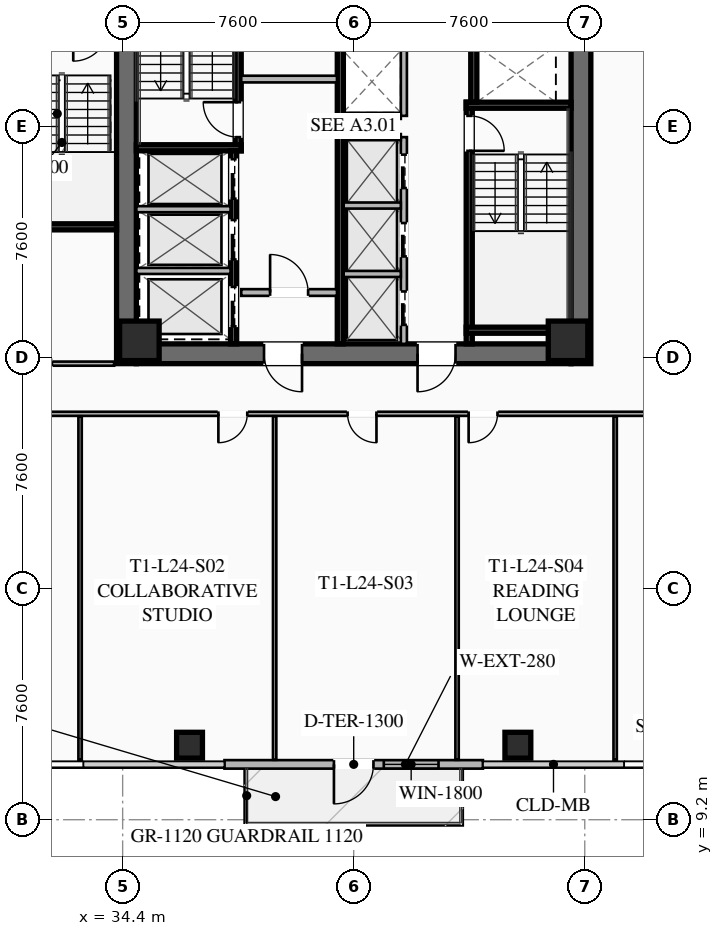
"""IFC4 building model, lengths in metres.
Left out: names, types, materials, properties, quantities, classifications, styles, units other than length and angle.
Written with IfcOpenShell. Run it as: python <this file> out.ifc"""

import sys

from ifc_helpers import new_model, si_unit, direction, frame, frame_2d, origin, origin_2d, place, context, subcontext, project, spatial, rectangle, hollow_rectangle, extrude, element, fill, save


model = new_model("IFC4")
c1 = context("Model", 3, precision=1e-05, world=origin(), true_north=direction((0.0, 1.0)))
c2 = subcontext(c1, "Body", "Model", "MODEL_VIEW")
j1 = project(units=[si_unit("LENGTHUNIT", "METRE"), si_unit("PLANEANGLEUNIT", "RADIAN")], contexts=[c1])
p1 = place(None, origin())
s1 = spatial("IfcSite", under=j1, at=p1, CompositionType="ELEMENT")
p2 = place(p1, origin())
s2 = spatial("IfcBuilding", under=s1, at=p2, CompositionType="ELEMENT")
p3 = place(p2, frame((0.0, 0.0, 92.05)))
s3 = spatial("IfcBuildingStorey", under=s2, at=p3, CompositionType="ELEMENT", Elevation=92.05)
for number, where, z_axis, x_axis in (
    (1, (34.525, 24.2, 0.0), (0.0, 0.0, 1.0), (0.0, 1.0, 0.0)),
    (2, (49.475, 39.8, 0.0), (0.0, 0.0, 1.0), (0.0, -1.0, 0.0)),
):
    element("IfcWall", number, at=place(p3, frame(where, z_axis=z_axis, x_axis=x_axis)), inside=s3, PredefinedType="SHEAR", context=c2, shape_type="SweptSolid", body=[
        extrude(rectangle(XDim=15.6, YDim=0.65, at=frame_2d((7.8, 0.0))), origin(), (0.0, 0.0, 1.0), 3.55),
    ])
p4 = place(p3, frame((49.15, 24.525, 0.0), z_axis=(0.0, 0.0, 1.0), x_axis=(-1.0, 0.0, 0.0)))
e3 = element("IfcWall", 3, at=p4, inside=s3, PredefinedType="SHEAR", context=c2, shape_type="SweptSolid", body=[
    extrude(rectangle(XDim=14.3, YDim=0.65, at=frame_2d((7.15, 0.0))), origin(), (0.0, 0.0, 1.0), 3.55),
])
p5 = place(p4, frame((8.85, 0.0, 0.0)))
e4 = element("IfcOpeningElement", 4, at=p5, cuts=e3, PredefinedType="OPENING", context=c2, shape_type="SweptSolid", body=[
    extrude(rectangle(XDim=1.25, YDim=2.25, at=frame_2d((0.625, 1.125))), frame((0.0, 0.335, 0.0), z_axis=(0.0, -1.0, 0.0), x_axis=(1.0, 0.0, 0.0)), (0.0, 0.0, 1.0), 0.67),
])
p6 = place(p4, frame((3.8, 0.0, 0.0)))
e5 = element("IfcOpeningElement", 5, at=p6, cuts=e3, PredefinedType="OPENING", context=c2, shape_type="SweptSolid", body=[
    extrude(rectangle(XDim=1.25, YDim=2.25, at=frame_2d((0.625, 1.125))), frame((0.0, 0.335, 0.0), z_axis=(0.0, -1.0, 0.0), x_axis=(1.0, 0.0, 0.0)), (0.0, 0.0, 1.0), 0.67),
])
for number, where, z_axis, x_axis in (
    (6, (34.95, 24.95, 0.0), (0.0, 0.0, 1.0), (1.0, 0.0, 0.0)),
    (7, (49.05, 24.95, 0.0), (0.0, 0.0, 1.0), (1.0, 0.0, 0.0)),
):
    element("IfcColumn", number, at=place(p3, frame(where, z_axis=z_axis, x_axis=x_axis)), inside=s3, PredefinedType="COLUMN", context=c2, shape_type="SweptSolid", body=[
        extrude(hollow_rectangle(XDim=1.3, YDim=1.3, WallThickness=0.05, at=origin_2d()), origin(), (0.0, 0.0, 1.0), 3.35),
    ])
for number, where, z_axis, x_axis in (
    (8, (36.6, 11.65, 0.0), (0.0, 0.0, 1.0), (1.0, 0.0, 0.0)),
    (9, (47.4, 11.65, 0.0), (0.0, 0.0, 1.0), (1.0, 0.0, 0.0)),
):
    element("IfcColumn", number, at=place(p3, frame(where, z_axis=z_axis, x_axis=x_axis)), inside=s3, PredefinedType="COLUMN", context=c2, shape_type="SweptSolid", body=[
        extrude(hollow_rectangle(XDim=0.85, YDim=0.85, WallThickness=0.035, at=origin_2d()), origin(), (0.0, 0.0, 1.0), 3.35),
    ])
p7 = place(p3, frame((46.25, 11.02, 0.0), z_axis=(0.0, 0.0, 1.0), x_axis=(-1.0, 0.0, 0.0)))
e10 = element("IfcWall", 10, at=p7, inside=s3, PredefinedType="SOLIDWALL", context=c2, shape_type="SweptSolid", body=[
    extrude(rectangle(XDim=8.5, YDim=0.28, at=frame_2d((4.25, 0.0))), origin(), (0.0, 0.0, 1.0), 3.35),
])
p8 = place(p7, frame((3.6, 0.0, 0.0)))
e11 = element("IfcOpeningElement", 11, at=p8, cuts=e10, PredefinedType="OPENING", context=c2, shape_type="SweptSolid", body=[
    extrude(rectangle(XDim=1.3, YDim=2.15, at=frame_2d((0.65, 1.075))), frame((0.0, 0.15, 0.0), z_axis=(0.0, -1.0, 0.0), x_axis=(1.0, 0.0, 0.0)), (0.0, 0.0, 1.0), 0.3),
])
p9 = place(p7, frame((1.46, 0.0, 0.85)))
e12 = element("IfcOpeningElement", 12, at=p9, cuts=e10, PredefinedType="OPENING", context=c2, shape_type="SweptSolid", body=[
    extrude(rectangle(XDim=1.8, YDim=1.92, at=frame_2d((0.9, 0.96))), frame((0.0, 0.15, 0.0), z_axis=(0.0, -1.0, 0.0), x_axis=(1.0, 0.0, 0.0)), (0.0, 0.0, 1.0), 0.3),
])
p10 = place(p3, frame((38.2, 31.2, 0.0), z_axis=(0.0, 0.0, 1.0), x_axis=(0.0, 1.0, 0.0)))
e13 = element("IfcWall", 13, at=p10, inside=s3, PredefinedType="SHEAR", context=c2, shape_type="SweptSolid", body=[
    extrude(rectangle(XDim=7.95, YDim=0.2, at=frame_2d((3.975, 0.0))), origin(), (0.0, 0.0, 1.0), 3.35),
])
p11 = place(p10, frame((0.45, 0.0, 0.0)))
e14 = element("IfcOpeningElement", 14, at=p11, cuts=e13, PredefinedType="OPENING", context=c2, shape_type="SweptSolid", body=[
    extrude(rectangle(XDim=1.15, YDim=2.2, at=frame_2d((0.575, 1.1))), frame((0.0, 0.11, 0.0), z_axis=(0.0, -1.0, 0.0), x_axis=(1.0, 0.0, 0.0)), (0.0, 0.0, 1.0), 0.22),
])
p12 = place(p3, frame((34.85, 31.3, 0.0), z_axis=(0.0, 0.0, 1.0), x_axis=(1.0, 0.0, 0.0)))
e15 = element("IfcWall", 15, at=p12, inside=s3, PredefinedType="SHEAR", context=c2, shape_type="SweptSolid", body=[
    extrude(rectangle(XDim=3.45, YDim=0.2, at=frame_2d((1.725, 0.0))), origin(), (0.0, 0.0, 1.0), 3.35),
])
p13 = place(p3, frame((45.8, 32.8, 0.0), z_axis=(0.0, 0.0, 1.0), x_axis=(0.0, -1.0, 0.0)))
e16 = element("IfcWall", 16, at=p13, inside=s3, PredefinedType="SHEAR", context=c2, shape_type="SweptSolid", body=[
    extrude(rectangle(XDim=7.95, YDim=0.2, at=frame_2d((3.975, 0.0))), origin(), (0.0, 0.0, 1.0), 3.35),
])
p14 = place(p13, frame((0.45, 0.0, 0.0)))
e17 = element("IfcOpeningElement", 17, at=p14, cuts=e16, PredefinedType="OPENING", context=c2, shape_type="SweptSolid", body=[
    extrude(rectangle(XDim=1.15, YDim=2.2, at=frame_2d((0.575, 1.1))), frame((0.0, 0.11, 0.0), z_axis=(0.0, -1.0, 0.0), x_axis=(1.0, 0.0, 0.0)), (0.0, 0.0, 1.0), 0.22),
])
for number, where, z_axis, x_axis in (
    (18, (45.7, 32.7, 0.0), (0.0, 0.0, 1.0), (1.0, 0.0, 0.0)),
    (19, (45.7, 25.3, 0.0), (0.0, 0.0, 1.0), (1.0, 0.0, 0.0)),
):
    element("IfcWall", number, at=place(p3, frame(where, z_axis=z_axis, x_axis=x_axis)), inside=s3, PredefinedType="SHEAR", context=c2, shape_type="SweptSolid", body=[
        extrude(rectangle(XDim=3.45, YDim=0.2, at=frame_2d((1.725, 0.0))), origin(), (0.0, 0.0, 1.0), 3.35),
    ])
p15 = place(p3, frame((41.56, 24.85, 0.0), z_axis=(0.0, 0.0, 1.0), x_axis=(0.0, 1.0, 0.0)))
e20 = element("IfcWall", 20, at=p15, inside=s3, PredefinedType="SHEAR", context=c2, shape_type="SweptSolid", body=[
    extrude(rectangle(XDim=14.3, YDim=0.2, at=frame_2d((7.15, 0.0))), origin(), (0.0, 0.0, 1.0), 3.35),
])
p16 = place(p3, frame((38.3, 33.56, 0.0), z_axis=(0.0, 0.0, 1.0), x_axis=(1.0, 0.0, 0.0)))
e21 = element("IfcWall", 21, at=p16, inside=s3, PredefinedType="SOLIDWALL", context=c2, shape_type="SweptSolid", body=[
    extrude(rectangle(XDim=3.15, YDim=0.22, at=frame_2d((1.575, 0.0))), origin(), (0.0, 0.0, 1.0), 2.703),
])
p17 = place(p3, frame((38.3, 26.54, 0.0), z_axis=(0.0, 0.0, 1.0), x_axis=(1.0, 0.0, 0.0)))
e22 = element("IfcWall", 22, at=p17, inside=s3, PredefinedType="SOLIDWALL", context=c2, shape_type="SweptSolid", body=[
    extrude(rectangle(XDim=3.15, YDim=0.22, at=frame_2d((1.575, 0.0))), origin(), (0.0, 0.0, 1.0), 2.703),
])
p18 = place(p17, frame((0.95, 0.0, 0.0)))
e23 = element("IfcOpeningElement", 23, at=p18, cuts=e22, PredefinedType="OPENING", context=c2, shape_type="SweptSolid", body=[
    extrude(rectangle(XDim=1.25, YDim=2.25, at=frame_2d((0.625, 1.125))), frame((0.0, 0.12, 0.0), z_axis=(0.0, -1.0, 0.0), x_axis=(1.0, 0.0, 0.0)), (0.0, 0.0, 1.0), 0.24),
])
p19 = place(p3, frame((38.05, 24.85, 0.0), z_axis=(0.0, 0.0, 1.0), x_axis=(0.0, 1.0, 0.0)))
e24 = element("IfcWall", 24, at=p19, inside=s3, PredefinedType="SHEAR", context=c2, shape_type="SweptSolid", body=[
    extrude(rectangle(XDim=6.35, YDim=0.2, at=frame_2d((3.175, 0.0))), origin(), (0.0, 0.0, 1.0), 3.35),
])
p20 = place(p19, frame((4.775, 0.0, 0.0)))
e25 = element("IfcOpeningElement", 25, at=p20, cuts=e24, PredefinedType="OPENING", context=c2, shape_type="SweptSolid", body=[
    extrude(rectangle(XDim=1.3, YDim=2.25, at=frame_2d((0.65, 1.125))), frame((0.0, 0.11, 0.0), z_axis=(0.0, -1.0, 0.0), x_axis=(1.0, 0.0, 0.0)), (0.0, 0.0, 1.0), 0.22),
])
p21 = place(p19, frame((2.775, 0.0, 0.0)))
e26 = element("IfcOpeningElement", 26, at=p21, cuts=e24, PredefinedType="OPENING", context=c2, shape_type="SweptSolid", body=[
    extrude(rectangle(XDim=1.3, YDim=2.25, at=frame_2d((0.65, 1.125))), frame((0.0, 0.11, 0.0), z_axis=(0.0, -1.0, 0.0), x_axis=(1.0, 0.0, 0.0)), (0.0, 0.0, 1.0), 0.22),
])
p22 = place(p19, frame((0.575, 0.0, 0.0)))
e27 = element("IfcOpeningElement", 27, at=p22, cuts=e24, PredefinedType="OPENING", context=c2, shape_type="SweptSolid", body=[
    extrude(rectangle(XDim=1.3, YDim=2.25, at=frame_2d((0.65, 1.125))), frame((0.0, 0.11, 0.0), z_axis=(0.0, -1.0, 0.0), x_axis=(1.0, 0.0, 0.0)), (0.0, 0.0, 1.0), 0.22),
])
for number, where, z_axis, x_axis in (
    (28, (34.85, 27.25, 0.0), (0.0, 0.0, 1.0), (1.0, 0.0, 0.0)),
    (29, (34.85, 29.28, 0.0), (0.0, 0.0, 1.0), (1.0, 0.0, 0.0)),
):
    element("IfcWall", number, at=place(p3, frame(where, z_axis=z_axis, x_axis=x_axis)), inside=s3, PredefinedType="SOLIDWALL", context=c2, shape_type="SweptSolid", body=[
        extrude(rectangle(XDim=3.1, YDim=0.2, at=frame_2d((1.55, 0.0))), origin(), (0.0, 0.0, 1.0), 3.35),
    ])
p23 = place(p3, frame((45.95, 39.15, 0.0), z_axis=(0.0, 0.0, 1.0), x_axis=(0.0, -1.0, 0.0)))
e30 = element("IfcWall", 30, at=p23, inside=s3, PredefinedType="SHEAR", context=c2, shape_type="SweptSolid", body=[
    extrude(rectangle(XDim=6.35, YDim=0.2, at=frame_2d((3.175, 0.0))), origin(), (0.0, 0.0, 1.0), 3.35),
])
p24 = place(p3, frame((43.65, 24.85, 0.0), z_axis=(0.0, 0.0, 1.0), x_axis=(0.0, 1.0, 0.0)))
e31 = element("IfcWall", 31, at=p24, inside=s3, PredefinedType="SOLIDWALL", context=c2, shape_type="SweptSolid", body=[
    extrude(rectangle(XDim=6.8, YDim=0.2, at=frame_2d((3.4, 0.0))), origin(), (0.0, 0.0, 1.0), 3.35),
])
p25 = place(p24, frame((0.625, 0.0, 0.0)))
e32 = element("IfcOpeningElement", 32, at=p25, cuts=e31, PredefinedType="OPENING", context=c2, shape_type="SweptSolid", body=[
    extrude(rectangle(XDim=1.1, YDim=2.2, at=frame_2d((0.55, 1.1))), frame((0.0, 0.11, 0.0), z_axis=(0.0, -1.0, 0.0), x_axis=(1.0, 0.0, 0.0)), (0.0, 0.0, 1.0), 0.22),
])
p26 = place(p24, frame((2.875, 0.0, 0.0)))
e33 = element("IfcOpeningElement", 33, at=p26, cuts=e31, PredefinedType="OPENING", context=c2, shape_type="SweptSolid", body=[
    extrude(rectangle(XDim=1.1, YDim=2.2, at=frame_2d((0.55, 1.1))), frame((0.0, 0.11, 0.0), z_axis=(0.0, -1.0, 0.0), x_axis=(1.0, 0.0, 0.0)), (0.0, 0.0, 1.0), 0.22),
])
p27 = place(p24, frame((5.125, 0.0, 0.0)))
e34 = element("IfcOpeningElement", 34, at=p27, cuts=e31, PredefinedType="OPENING", context=c2, shape_type="SweptSolid", body=[
    extrude(rectangle(XDim=1.1, YDim=2.2, at=frame_2d((0.55, 1.1))), frame((0.0, 0.11, 0.0), z_axis=(0.0, -1.0, 0.0), x_axis=(1.0, 0.0, 0.0)), (0.0, 0.0, 1.0), 0.22),
])
for number, where, z_axis, x_axis in (
    (35, (41.67, 27.15, 0.0), (0.0, 0.0, 1.0), (1.0, 0.0, 0.0)),
    (36, (41.67, 29.4, 0.0), (0.0, 0.0, 1.0), (1.0, 0.0, 0.0)),
    (37, (41.67, 31.65, 0.0), (0.0, 0.0, 1.0), (1.0, 0.0, 0.0)),
):
    element("IfcWall", number, at=place(p3, frame(where, z_axis=z_axis, x_axis=x_axis)), inside=s3, PredefinedType="SOLIDWALL", context=c2, shape_type="SweptSolid", body=[
        extrude(rectangle(XDim=1.88, YDim=0.2, at=frame_2d((0.94, 0.0))), origin(), (0.0, 0.0, 1.0), 3.35),
    ])
p28 = place(p3, frame((43.65, 32.35, 0.0), z_axis=(0.0, 0.0, 1.0), x_axis=(0.0, 1.0, 0.0)))
e38 = element("IfcWall", 38, at=p28, inside=s3, PredefinedType="SOLIDWALL", context=c2, shape_type="SweptSolid", body=[
    extrude(rectangle(XDim=6.8, YDim=0.2, at=frame_2d((3.4, 0.0))), origin(), (0.0, 0.0, 1.0), 3.35),
])
p29 = place(p3, frame((41.67, 32.35, 0.0), z_axis=(0.0, 0.0, 1.0), x_axis=(1.0, 0.0, 0.0)))
e39 = element("IfcWall", 39, at=p29, inside=s3, PredefinedType="SOLIDWALL", context=c2, shape_type="SweptSolid", body=[
    extrude(rectangle(XDim=1.88, YDim=0.2, at=frame_2d((0.94, 0.0))), origin(), (0.0, 0.0, 1.0), 3.35),
])
p30 = place(p3, frame((30.8, 28.7, 0.0), z_axis=(0.0, 0.0, 1.0), x_axis=(1.0, 0.0, 0.0)))
e40 = element("IfcWall", 40, at=p30, inside=s3, PredefinedType="SHEAR", context=c2, shape_type="SweptSolid", body=[
    extrude(rectangle(XDim=3.4, YDim=0.2, at=frame_2d((1.7, 0.0))), origin(), (0.0, 0.0, 1.0), 3.35),
])
p31 = place(p3, frame((53.1, 22.55, 0.0), z_axis=(0.0, 0.0, 1.0), x_axis=(-1.0, 0.0, 0.0)))
e41 = element("IfcWall", 41, at=p31, inside=s3, PredefinedType="PARTITIONING", context=c2, shape_type="SweptSolid", body=[
    extrude(rectangle(XDim=29.05, YDim=0.135, at=frame_2d((14.525, 0.0))), origin(), (0.0, 0.0, 1.0), 2.703),
])
p32 = place(p31, frame((27.72, 0.0, 0.0)))
e42 = element("IfcOpeningElement", 42, at=p32, cuts=e41, PredefinedType="OPENING", context=c2, shape_type="SweptSolid", body=[
    extrude(rectangle(XDim=0.95, YDim=2.05, at=frame_2d((0.475, 1.025))), frame((0.0, 0.077, 0.0), z_axis=(0.0, -1.0, 0.0), x_axis=(1.0, 0.0, 0.0)), (0.0, 0.0, 1.0), 0.155),
])
p33 = place(p31, frame((14.601, 0.0, 0.0)))
e43 = element("IfcOpeningElement", 43, at=p33, cuts=e41, PredefinedType="OPENING", context=c2, shape_type="SweptSolid", body=[
    extrude(rectangle(XDim=0.95, YDim=2.05, at=frame_2d((0.475, 1.025))), frame((0.0, 0.077, 0.0), z_axis=(0.0, -1.0, 0.0), x_axis=(1.0, 0.0, 0.0)), (0.0, 0.0, 1.0), 0.155),
])
p34 = place(p31, frame((10.351, 0.0, 0.0)))
e44 = element("IfcOpeningElement", 44, at=p34, cuts=e41, PredefinedType="OPENING", context=c2, shape_type="SweptSolid", body=[
    extrude(rectangle(XDim=0.95, YDim=2.05, at=frame_2d((0.475, 1.025))), frame((0.0, 0.077, 0.0), z_axis=(0.0, -1.0, 0.0), x_axis=(1.0, 0.0, 0.0)), (0.0, 0.0, 1.0), 0.155),
])
p35 = place(p31, frame((6.37, 0.0, 0.0)))
e45 = element("IfcOpeningElement", 45, at=p35, cuts=e41, PredefinedType="OPENING", context=c2, shape_type="SweptSolid", body=[
    extrude(rectangle(XDim=0.95, YDim=2.05, at=frame_2d((0.475, 1.025))), frame((0.0, 0.077, 0.0), z_axis=(0.0, -1.0, 0.0), x_axis=(1.0, 0.0, 0.0)), (0.0, 0.0, 1.0), 0.155),
])
p36 = place(p31, frame((0.38, 0.0, 0.0)))
e46 = element("IfcOpeningElement", 46, at=p36, cuts=e41, PredefinedType="OPENING", context=c2, shape_type="SweptSolid", body=[
    extrude(rectangle(XDim=0.95, YDim=2.05, at=frame_2d((0.475, 1.025))), frame((0.0, 0.077, 0.0), z_axis=(0.0, -1.0, 0.0), x_axis=(1.0, 0.0, 0.0)), (0.0, 0.0, 1.0), 0.155),
])
for number, where, z_axis, x_axis in (
    (47, (33.0, 11.17, 0.0), (0.0, 0.0, 1.0), (0.0, 1.0, 0.0)),
    (48, (39.4, 11.17, 0.0), (0.0, 0.0, 1.0), (0.0, 1.0, 0.0)),
    (49, (45.4, 11.17, 0.0), (0.0, 0.0, 1.0), (0.0, 1.0, 0.0)),
    (50, (50.6, 11.17, 0.0), (0.0, 0.0, 1.0), (0.0, 1.0, 0.0)),
):
    element("IfcWall", number, at=place(p3, frame(where, z_axis=z_axis, x_axis=x_axis)), inside=s3, PredefinedType="PARTITIONING", context=c2, shape_type="SweptSolid", body=[
        extrude(rectangle(XDim=11.3, YDim=0.11, at=frame_2d((5.65, 0.0))), origin(), (0.0, 0.0, 1.0), 2.703),
    ])
p37 = place(p3, frame((21.02, 24.2, 0.0), z_axis=(0.0, 0.0, 1.0), x_axis=(1.0, 0.0, 0.0)))
e51 = element("IfcWall", 51, at=p37, inside=s3, PredefinedType="PARTITIONING", context=c2, shape_type="SweptSolid", body=[
    extrude(rectangle(XDim=13.1, YDim=0.135, at=frame_2d((6.55, 0.0))), origin(), (0.0, 0.0, 1.0), 2.703),
])
p38 = place(p37, frame((10.105, 0.0, 0.0)))
e52 = element("IfcOpeningElement", 52, at=p38, cuts=e51, PredefinedType="OPENING", context=c2, shape_type="SweptSolid", body=[
    extrude(rectangle(XDim=0.95, YDim=2.05, at=frame_2d((0.475, 1.025))), frame((0.0, 0.077, 0.0), z_axis=(0.0, -1.0, 0.0), x_axis=(1.0, 0.0, 0.0)), (0.0, 0.0, 1.0), 0.155),
])
p39 = place(p8, origin())
e53 = element("IfcDoor", 53, at=p39, inside=s3, OperationType="SINGLE_SWING_RIGHT", PredefinedType="DOOR", context=c2, shape_type="SweptSolid", body=[
    extrude(rectangle(XDim=1.3, YDim=2.15, at=frame_2d((0.65, 1.075))), frame((0.0, 0.025, 0.0), z_axis=(0.0, -1.0, 0.0), x_axis=(1.0, 0.0, 0.0)), (0.0, 0.0, 1.0), 0.05),
])
fill(e11, e53)
p40 = place(p9, origin())
e54 = element("IfcWindow", 54, at=p40, inside=s3, PartitioningType="SINGLE_PANEL", PredefinedType="WINDOW", context=c2, shape_type="SweptSolid", body=[
    extrude(rectangle(XDim=1.8, YDim=1.92, at=frame_2d((0.9, 0.96))), frame((0.0, 0.03, 0.0), z_axis=(0.0, -1.0, 0.0), x_axis=(1.0, 0.0, 0.0)), (0.0, 0.0, 1.0), 0.06),
])
fill(e12, e54)
p41 = place(p5, origin())
e55 = element("IfcDoor", 55, at=p41, inside=s3, OperationType="SINGLE_SWING_LEFT", PredefinedType="DOOR", context=c2, shape_type="SweptSolid", body=[
    extrude(rectangle(XDim=1.25, YDim=2.25, at=frame_2d((0.625, 1.125))), frame((0.0, 0.025, 0.0), z_axis=(0.0, -1.0, 0.0), x_axis=(1.0, 0.0, 0.0)), (0.0, 0.0, 1.0), 0.05),
])
fill(e4, e55)
p42 = place(p6, origin())
e56 = element("IfcDoor", 56, at=p42, inside=s3, OperationType="SINGLE_SWING_RIGHT", PredefinedType="DOOR", context=c2, shape_type="SweptSolid", body=[
    extrude(rectangle(XDim=1.25, YDim=2.25, at=frame_2d((0.625, 1.125))), frame((0.0, 0.025, 0.0), z_axis=(0.0, -1.0, 0.0), x_axis=(1.0, 0.0, 0.0)), (0.0, 0.0, 1.0), 0.05),
])
fill(e5, e56)
p43 = place(p11, origin())
e57 = element("IfcDoor", 57, at=p43, inside=s3, OperationType="SINGLE_SWING_RIGHT", PredefinedType="DOOR", context=c2, shape_type="SweptSolid", body=[
    extrude(rectangle(XDim=1.15, YDim=2.2, at=frame_2d((0.575, 1.1))), frame((0.0, 0.025, 0.0), z_axis=(0.0, -1.0, 0.0), x_axis=(1.0, 0.0, 0.0)), (0.0, 0.0, 1.0), 0.05),
])
fill(e14, e57)
p44 = place(p14, origin())
e58 = element("IfcDoor", 58, at=p44, inside=s3, OperationType="SINGLE_SWING_RIGHT", PredefinedType="DOOR", context=c2, shape_type="SweptSolid", body=[
    extrude(rectangle(XDim=1.15, YDim=2.2, at=frame_2d((0.575, 1.1))), frame((0.0, 0.025, 0.0), z_axis=(0.0, -1.0, 0.0), x_axis=(1.0, 0.0, 0.0)), (0.0, 0.0, 1.0), 0.05),
])
fill(e17, e58)
p45 = place(p18, origin())
e59 = element("IfcDoor", 59, at=p45, inside=s3, OperationType="SINGLE_SWING_LEFT", PredefinedType="DOOR", context=c2, shape_type="SweptSolid", body=[
    extrude(rectangle(XDim=1.25, YDim=2.25, at=frame_2d((0.625, 1.125))), frame((0.0, 0.025, 0.0), z_axis=(0.0, -1.0, 0.0), x_axis=(1.0, 0.0, 0.0)), (0.0, 0.0, 1.0), 0.05),
])
fill(e23, e59)
p46 = place(p33, origin())
e60 = element("IfcDoor", 60, at=p46, inside=s3, OperationType="SINGLE_SWING_RIGHT", PredefinedType="DOOR", context=c2, shape_type="SweptSolid", body=[
    extrude(rectangle(XDim=0.95, YDim=2.05, at=frame_2d((0.475, 1.025))), frame((0.0, 0.025, 0.0), z_axis=(0.0, -1.0, 0.0), x_axis=(1.0, 0.0, 0.0)), (0.0, 0.0, 1.0), 0.05),
])
fill(e43, e60)
p47 = place(p34, origin())
e61 = element("IfcDoor", 61, at=p47, inside=s3, OperationType="SINGLE_SWING_LEFT", PredefinedType="DOOR", context=c2, shape_type="SweptSolid", body=[
    extrude(rectangle(XDim=0.95, YDim=2.05, at=frame_2d((0.475, 1.025))), frame((0.0, 0.025, 0.0), z_axis=(0.0, -1.0, 0.0), x_axis=(1.0, 0.0, 0.0)), (0.0, 0.0, 1.0), 0.05),
])
fill(e44, e61)
p48 = place(p35, origin())
e62 = element("IfcDoor", 62, at=p48, inside=s3, OperationType="SINGLE_SWING_RIGHT", PredefinedType="DOOR", context=c2, shape_type="SweptSolid", body=[
    extrude(rectangle(XDim=0.95, YDim=2.05, at=frame_2d((0.475, 1.025))), frame((0.0, 0.025, 0.0), z_axis=(0.0, -1.0, 0.0), x_axis=(1.0, 0.0, 0.0)), (0.0, 0.0, 1.0), 0.05),
])
fill(e45, e62)
p49 = place(p20, origin())
e63 = element("IfcDoor", 63, at=p49, inside=s3, OperationType="SLIDING_TO_LEFT", PredefinedType="DOOR", context=c2, shape_type="SweptSolid", body=[
    extrude(rectangle(XDim=1.3, YDim=2.25, at=frame_2d((0.65, 1.125))), frame((0.0, 0.025, 0.0), z_axis=(0.0, -1.0, 0.0), x_axis=(1.0, 0.0, 0.0)), (0.0, 0.0, 1.0), 0.05),
])
fill(e25, e63)
p50 = place(p21, origin())
e64 = element("IfcDoor", 64, at=p50, inside=s3, OperationType="SLIDING_TO_LEFT", PredefinedType="DOOR", context=c2, shape_type="SweptSolid", body=[
    extrude(rectangle(XDim=1.3, YDim=2.25, at=frame_2d((0.65, 1.125))), frame((0.0, 0.025, 0.0), z_axis=(0.0, -1.0, 0.0), x_axis=(1.0, 0.0, 0.0)), (0.0, 0.0, 1.0), 0.05),
])
fill(e26, e64)
p51 = place(p22, origin())
e65 = element("IfcDoor", 65, at=p51, inside=s3, OperationType="SLIDING_TO_LEFT", PredefinedType="DOOR", context=c2, shape_type="SweptSolid", body=[
    extrude(rectangle(XDim=1.3, YDim=2.25, at=frame_2d((0.65, 1.125))), frame((0.0, 0.025, 0.0), z_axis=(0.0, -1.0, 0.0), x_axis=(1.0, 0.0, 0.0)), (0.0, 0.0, 1.0), 0.05),
])
fill(e27, e65)
p52 = place(p25, origin())
e66 = element("IfcDoor", 66, at=p52, inside=s3, OperationType="SLIDING_TO_LEFT", PredefinedType="DOOR", context=c2, shape_type="SweptSolid", body=[
    extrude(rectangle(XDim=1.1, YDim=2.2, at=frame_2d((0.55, 1.1))), frame((0.0, 0.025, 0.0), z_axis=(0.0, -1.0, 0.0), x_axis=(1.0, 0.0, 0.0)), (0.0, 0.0, 1.0), 0.05),
])
fill(e32, e66)
p53 = place(p26, origin())
e67 = element("IfcDoor", 67, at=p53, inside=s3, OperationType="SLIDING_TO_LEFT", PredefinedType="DOOR", context=c2, shape_type="SweptSolid", body=[
    extrude(rectangle(XDim=1.1, YDim=2.2, at=frame_2d((0.55, 1.1))), frame((0.0, 0.025, 0.0), z_axis=(0.0, -1.0, 0.0), x_axis=(1.0, 0.0, 0.0)), (0.0, 0.0, 1.0), 0.05),
])
fill(e33, e67)
p54 = place(p27, origin())
e68 = element("IfcDoor", 68, at=p54, inside=s3, OperationType="SLIDING_TO_LEFT", PredefinedType="DOOR", context=c2, shape_type="SweptSolid", body=[
    extrude(rectangle(XDim=1.1, YDim=2.2, at=frame_2d((0.55, 1.1))), frame((0.0, 0.025, 0.0), z_axis=(0.0, -1.0, 0.0), x_axis=(1.0, 0.0, 0.0)), (0.0, 0.0, 1.0), 0.05),
])
fill(e34, e68)
save(model, sys.argv[1])
